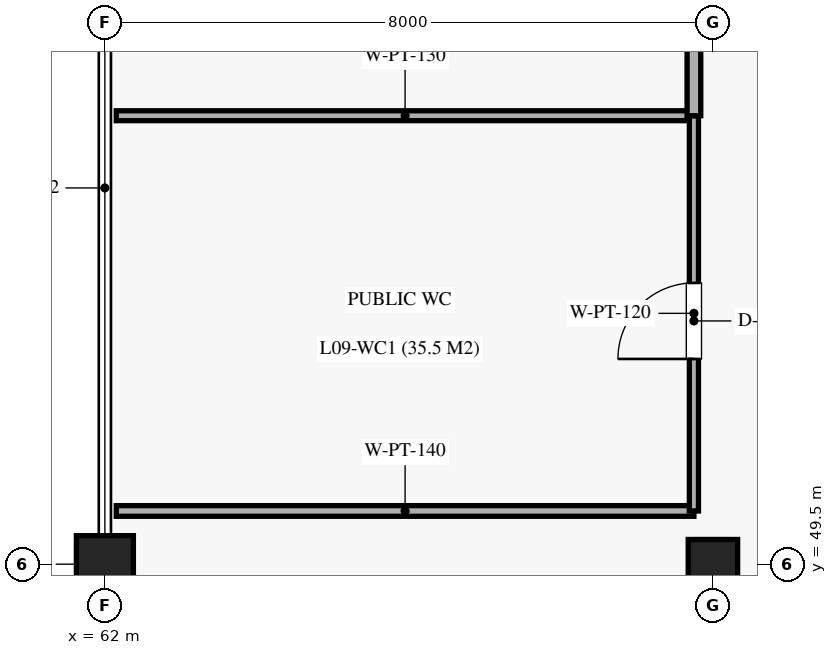
"""IFC4 building model, lengths in metres.
Left out: names, types, materials, properties, quantities, classifications, styles, units other than length and angle.
Written with IfcOpenShell. Run it as: python <this file> out.ifc"""

import sys

from ifc_helpers import new_model, si_unit, direction, frame, frame_2d, origin, origin_2d, place, context, subcontext, project, spatial, rectangle, extrude, element, fill, save


model = new_model("IFC4")
c1 = context("Model", 3, precision=1e-05, world=origin(), true_north=direction((0.0, 1.0)))
c2 = subcontext(c1, "Body", "Model", "MODEL_VIEW")
j1 = project(units=[si_unit("LENGTHUNIT", "METRE"), si_unit("PLANEANGLEUNIT", "RADIAN")], contexts=[c1])
p1 = place(None, origin())
s1 = spatial("IfcSite", under=j1, at=p1, CompositionType="ELEMENT")
p2 = place(p1, origin())
s2 = spatial("IfcBuilding", under=s1, at=p2, CompositionType="ELEMENT")
p3 = place(p2, frame((0.0, 0.0, 46.92)))
s3 = spatial("IfcBuildingStorey", under=s2, at=p3, CompositionType="ELEMENT", Elevation=46.92)
p4 = place(p3, frame((62.0, 49.5, 0.0), z_axis=(0.0, 0.0, 1.0), x_axis=(1.0, 0.0, 0.0)))
e1 = element("IfcColumn", 1, at=p4, inside=s3, PredefinedType="COLUMN", context=c2, shape_type="SweptSolid", body=[
    extrude(rectangle(XDim=0.75, YDim=0.75, at=origin_2d()), origin(), (0.0, 0.0, 1.0), 5.1),
])
p5 = place(p3, frame((70.0, 49.5, 0.0), z_axis=(0.0, 0.0, 1.0), x_axis=(1.0, 0.0, 0.0)))
e2 = element("IfcColumn", 2, at=p5, inside=s3, PredefinedType="COLUMN", context=c2, shape_type="SweptSolid", body=[
    extrude(rectangle(XDim=0.65, YDim=0.65, at=origin_2d()), origin(), (0.0, 0.0, 1.0), 5.1),
])
p6 = place(p3, frame((62.15, 50.2, 0.0), z_axis=(0.0, 0.0, 1.0), x_axis=(1.0, 0.0, 0.0)))
e3 = element("IfcWall", 3, at=p6, inside=s3, PredefinedType="PARTITIONING", context=c2, shape_type="SweptSolid", body=[
    extrude(rectangle(XDim=7.6, YDim=0.14, at=frame_2d((3.8, 0.0))), origin(), (0.0, 0.0, 1.0), 3.97),
])
p7 = place(p3, frame((62.15, 55.4, 0.0), z_axis=(0.0, 0.0, 1.0), x_axis=(1.0, 0.0, 0.0)))
e4 = element("IfcWall", 4, at=p7, inside=s3, PredefinedType="PARTITIONING", context=c2, shape_type="SweptSolid", body=[
    extrude(rectangle(XDim=7.6, YDim=0.13, at=frame_2d((3.8, 0.0))), origin(), (0.0, 0.0, 1.0), 3.97),
])
p8 = place(p3, frame((69.75, 50.2, 0.0), z_axis=(0.0, 0.0, 1.0), x_axis=(0.0, 1.0, 0.0)))
e5 = element("IfcWall", 5, at=p8, inside=s3, PredefinedType="PARTITIONING", context=c2, shape_type="SweptSolid", body=[
    extrude(rectangle(XDim=5.2, YDim=0.12, at=frame_2d((2.6, 0.0))), origin(), (0.0, 0.0, 1.0), 3.97),
])
p9 = place(p8, frame((2.0, 0.0, 0.0)))
e6 = element("IfcOpeningElement", 6, at=p9, cuts=e5, PredefinedType="OPENING", context=c2, shape_type="SweptSolid", body=[
    extrude(rectangle(XDim=1.0, YDim=2.1, at=frame_2d((0.5, 1.05))), frame((0.0, 0.07, 0.0), z_axis=(0.0, -1.0, 0.0), x_axis=(1.0, 0.0, 0.0)), (0.0, 0.0, 1.0), 0.14),
])
p10 = place(p3, frame((69.75, 55.4, 0.0), z_axis=(0.0, 0.0, 1.0), x_axis=(0.0, 1.0, 0.0)))
e7 = element("IfcWall", 7, at=p10, inside=s3, PredefinedType="PARTITIONING", context=c2, shape_type="SweptSolid", body=[
    extrude(rectangle(XDim=3.5, YDim=0.18, at=frame_2d((1.75, 0.0))), origin(), (0.0, 0.0, 1.0), 3.97),
])
p11 = place(p10, frame((1.15, 0.0, 0.0)))
e8 = element("IfcOpeningElement", 8, at=p11, cuts=e7, PredefinedType="OPENING", context=c2, shape_type="SweptSolid", body=[
    extrude(rectangle(XDim=1.05, YDim=2.15, at=frame_2d((0.525, 1.075))), frame((0.0, 0.1, 0.0), z_axis=(0.0, -1.0, 0.0), x_axis=(1.0, 0.0, 0.0)), (0.0, 0.0, 1.0), 0.2),
])
p12 = place(p9, origin())
e9 = element("IfcDoor", 9, at=p12, inside=s3, OperationType="SINGLE_SWING_LEFT", PredefinedType="DOOR", context=c2, shape_type="SweptSolid", body=[
    extrude(rectangle(XDim=1.0, YDim=2.1, at=frame_2d((0.5, 1.05))), frame((0.0, 0.025, 0.0), z_axis=(0.0, -1.0, 0.0), x_axis=(1.0, 0.0, 0.0)), (0.0, 0.0, 1.0), 0.05),
])
fill(e6, e9)
save(model, sys.argv[1])
